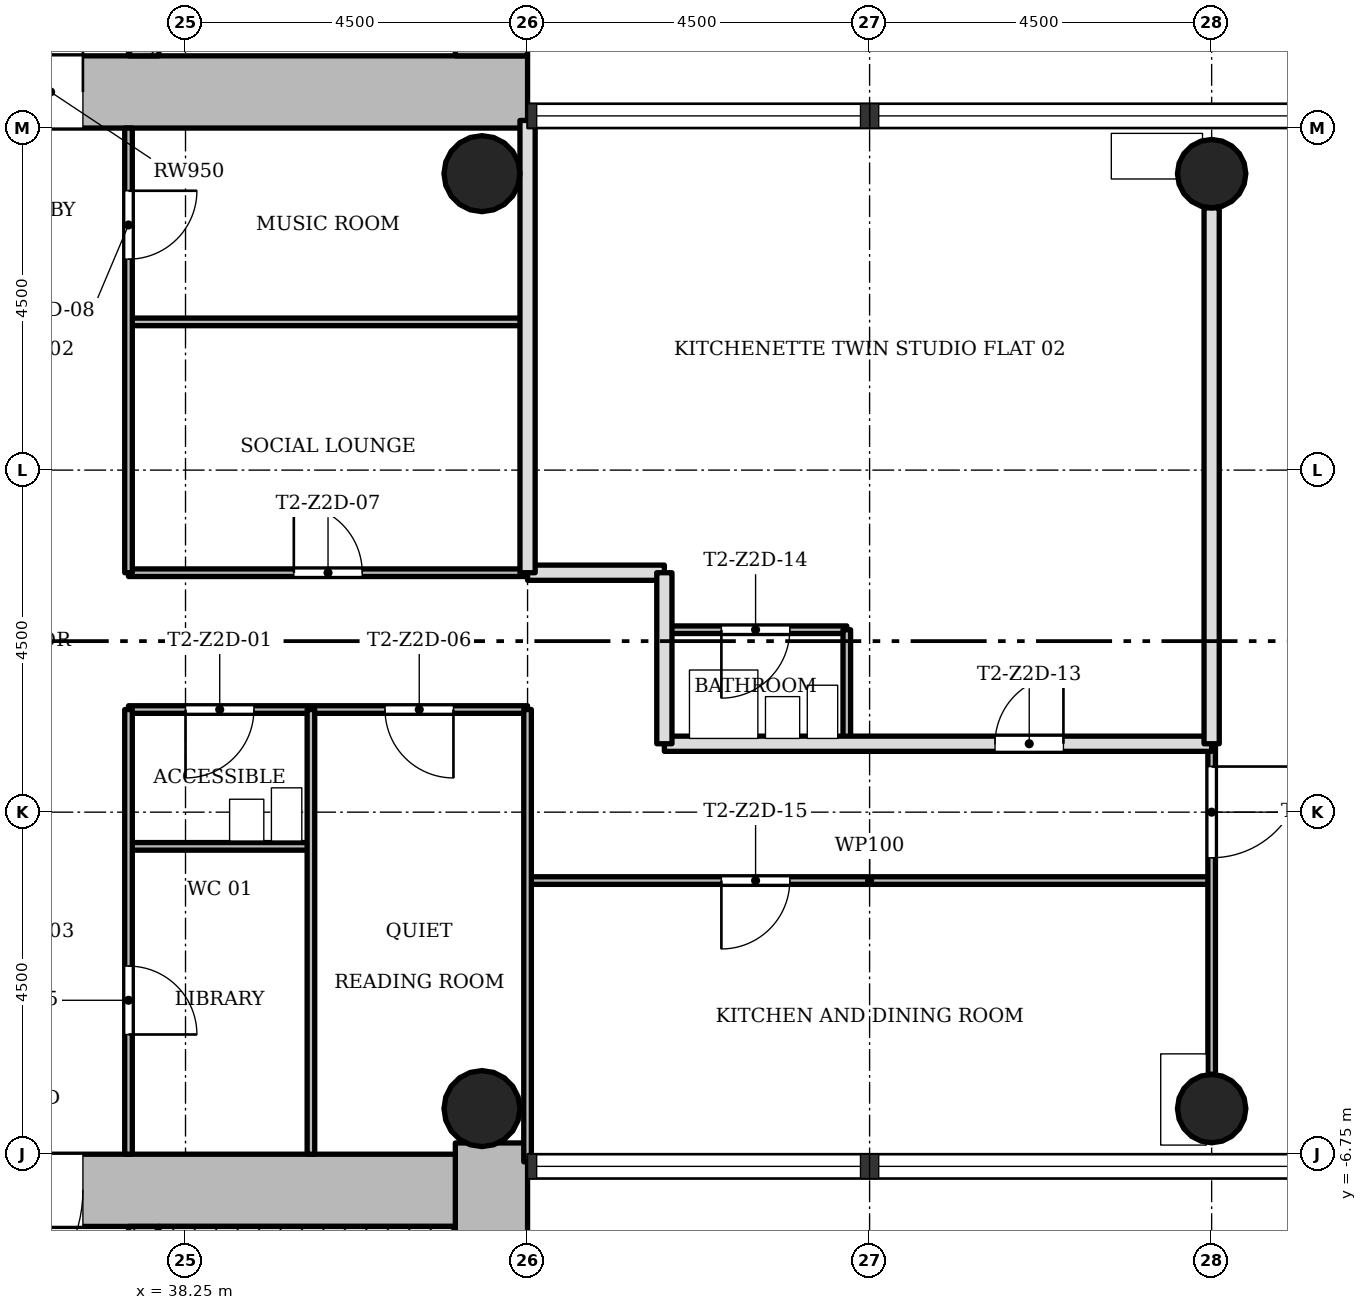
"""IFC4 building model, lengths in metres.
Left out: names, types, materials, properties, quantities, classifications, styles, units other than length and angle.
Written with IfcOpenShell. Run it as: python <this file> out.ifc"""

import sys

from ifc_helpers import new_model, si_unit, direction, frame, frame_2d, origin, origin_2d, place, context, subcontext, project, spatial, rectangle, hollow_circle, extrude, element, fill, save


model = new_model("IFC4")
c1 = context("Model", 3, precision=1e-05, world=origin(), true_north=direction((0.0, 1.0)))
c2 = subcontext(c1, "Body", "Model", "MODEL_VIEW")
j1 = project(units=[si_unit("LENGTHUNIT", "METRE"), si_unit("PLANEANGLEUNIT", "RADIAN")], contexts=[c1])
p1 = place(None, origin())
s1 = spatial("IfcSite", under=j1, at=p1, CompositionType="ELEMENT")
p2 = place(p1, origin())
s2 = spatial("IfcBuilding", under=s1, at=p2, CompositionType="ELEMENT")
p3 = place(p2, frame((0.0, 0.0, 120.8)))
s3 = spatial("IfcBuildingStorey", under=s2, at=p3, CompositionType="ELEMENT", Elevation=120.8)
p4 = place(p3, frame((30.2, 7.225, 0.0), z_axis=(0.0, 0.0, 1.0), x_axis=(1.0, 0.0, 0.0)))
e1 = element("IfcWall", 1, at=p4, inside=s3, PredefinedType="SHEAR", context=c2, shape_type="SweptSolid", body=[
    extrude(rectangle(XDim=12.55, YDim=0.95, at=frame_2d((6.275, 0.0))), origin(), (0.0, 0.0, 1.0), 3.4),
])
p5 = place(p4, frame((4.9, 0.0, 0.0)))
e2 = element("IfcOpeningElement", 2, at=p5, cuts=e1, PredefinedType="OPENING", context=c2, shape_type="SweptSolid", body=[
    extrude(rectangle(XDim=1.8, YDim=2.1, at=frame_2d((0.9, 1.05))), frame((0.0, 0.485, 0.0), z_axis=(0.0, -1.0, 0.0), x_axis=(1.0, 0.0, 0.0)), (0.0, 0.0, 1.0), 0.97),
])
p6 = place(p3, frame((42.275, 7.7, 0.0), z_axis=(0.0, 0.0, 1.0), x_axis=(0.0, 1.0, 0.0)))
e3 = element("IfcWall", 3, at=p6, inside=s3, PredefinedType="SHEAR", context=c2, shape_type="SweptSolid", body=[
    extrude(rectangle(XDim=8.05, YDim=0.95, at=frame_2d((4.025, 0.0))), origin(), (0.0, 0.0, 1.0), 3.4),
])
p7 = place(p3, frame((37.7, 7.7, 0.0), z_axis=(0.0, 0.0, 1.0), x_axis=(0.0, 1.0, 0.0)))
e4 = element("IfcWall", 4, at=p7, inside=s3, PredefinedType="SHEAR", context=c2, shape_type="SweptSolid", body=[
    extrude(rectangle(XDim=7.1, YDim=0.4, at=frame_2d((3.55, 0.0))), origin(), (0.0, 0.0, 1.0), 3.4),
])
p8 = place(p7, frame((0.8, 0.0, 0.0)))
e5 = element("IfcOpeningElement", 5, at=p8, cuts=e4, PredefinedType="OPENING", context=c2, shape_type="SweptSolid", body=[
    extrude(rectangle(XDim=1.1, YDim=2.1, at=frame_2d((0.55, 1.05))), frame((0.0, 0.21, 0.0), z_axis=(0.0, -1.0, 0.0), x_axis=(1.0, 0.0, 0.0)), (0.0, 0.0, 1.0), 0.42),
])
p9 = place(p7, frame((3.0, 0.0, 0.0)))
e6 = element("IfcOpeningElement", 6, at=p9, cuts=e4, PredefinedType="OPENING", context=c2, shape_type="SweptSolid", body=[
    extrude(rectangle(XDim=1.1, YDim=2.1, at=frame_2d((0.55, 1.05))), frame((0.0, 0.21, 0.0), z_axis=(0.0, -1.0, 0.0), x_axis=(1.0, 0.0, 0.0)), (0.0, 0.0, 1.0), 0.42),
])
p10 = place(p7, frame((5.2, 0.0, 0.0)))
e7 = element("IfcOpeningElement", 7, at=p10, cuts=e4, PredefinedType="OPENING", context=c2, shape_type="SweptSolid", body=[
    extrude(rectangle(XDim=1.1, YDim=2.1, at=frame_2d((0.55, 1.05))), frame((0.0, 0.21, 0.0), z_axis=(0.0, -1.0, 0.0), x_axis=(1.0, 0.0, 0.0)), (0.0, 0.0, 1.0), 0.42),
])
p11 = place(p3, frame((42.275, -14.8, 0.0), z_axis=(0.0, 0.0, 1.0), x_axis=(0.0, 1.0, 0.0)))
e8 = element("IfcWall", 8, at=p11, inside=s3, PredefinedType="SHEAR", context=c2, shape_type="SweptSolid", body=[
    extrude(rectangle(XDim=8.198, YDim=0.95, at=frame_2d((4.099, 0.0))), origin(), (0.0, 0.0, 1.0), 3.4),
])
p12 = place(p3, frame((41.8, -7.225, 0.0), z_axis=(0.0, 0.0, 1.0), x_axis=(-1.0, 0.0, 0.0)))
e9 = element("IfcWall", 9, at=p12, inside=s3, PredefinedType="SHEAR", context=c2, shape_type="SweptSolid", body=[
    extrude(rectangle(XDim=12.55, YDim=0.95, at=frame_2d((6.275, 0.0))), origin(), (0.0, 0.0, 1.0), 3.4),
])
p13 = place(p12, frame((4.9, 0.0, 0.0)))
e10 = element("IfcOpeningElement", 10, at=p13, cuts=e9, PredefinedType="OPENING", context=c2, shape_type="SweptSolid", body=[
    extrude(rectangle(XDim=1.8, YDim=2.1, at=frame_2d((0.9, 1.05))), frame((0.0, 0.485, 0.0), z_axis=(0.0, -1.0, 0.0), x_axis=(1.0, 0.0, 0.0)), (0.0, 0.0, 1.0), 0.97),
])
p14 = place(p3, frame((37.7, -14.8, 0.0), z_axis=(0.0, 0.0, 1.0), x_axis=(0.0, 1.0, 0.0)))
e11 = element("IfcWall", 11, at=p14, inside=s3, PredefinedType="SHEAR", context=c2, shape_type="SweptSolid", body=[
    extrude(rectangle(XDim=7.1, YDim=0.4, at=frame_2d((3.55, 0.0))), origin(), (0.0, 0.0, 1.0), 3.4),
])
p15 = place(p14, frame((5.5, 0.0, 0.0)))
e12 = element("IfcOpeningElement", 12, at=p15, cuts=e11, PredefinedType="OPENING", context=c2, shape_type="SweptSolid", body=[
    extrude(rectangle(XDim=0.9, YDim=2.1, at=frame_2d((0.45, 1.05))), frame((0.0, 0.21, 0.0), z_axis=(0.0, -1.0, 0.0), x_axis=(1.0, 0.0, 0.0)), (0.0, 0.0, 1.0), 0.42),
])
for number, where, z_axis, x_axis in (
    (13, (51.75, -6.15, 0.0), (0.0, 0.0, 1.0), (1.0, 0.0, 0.0)),
    (14, (51.75, 6.15, 0.0), (0.0, 0.0, 1.0), (1.0, 0.0, 0.0)),
):
    element("IfcColumn", number, at=place(p3, frame(where, z_axis=z_axis, x_axis=x_axis)), inside=s3, PredefinedType="COLUMN", context=c2, shape_type="SweptSolid", body=[
        extrude(hollow_circle(Radius=0.45, WallThickness=0.032, at=origin_2d()), origin(), (0.0, 0.0, 1.0), 3.4),
    ])
for number, where, z_axis, x_axis in (
    (15, (42.15, -6.15, 0.0), (0.0, 0.0, 1.0), (1.0, 0.0, 0.0)),
    (16, (42.15, 6.15, 0.0), (0.0, 0.0, 1.0), (1.0, 0.0, 0.0)),
):
    element("IfcColumn", number, at=place(p3, frame(where, z_axis=z_axis, x_axis=x_axis)), inside=s3, PredefinedType="COLUMN", context=c2, shape_type="SweptSolid", body=[
        extrude(hollow_circle(Radius=0.5, WallThickness=0.036, at=origin_2d()), origin(), (0.0, 0.0, 1.0), 3.4),
    ])
p16 = place(p3, frame((51.75, -3.15, 0.0), z_axis=(0.0, 0.0, 1.0), x_axis=(-1.0, 0.0, 0.0)))
e17 = element("IfcWall", 17, at=p16, inside=s3, PredefinedType="PARTITIONING", context=c2, shape_type="SweptSolid", body=[
    extrude(rectangle(XDim=9.0, YDim=0.1, at=frame_2d((4.5, 0.0))), origin(), (0.0, 0.0, 1.0), 3.0),
])
p17 = place(p16, frame((5.55, 0.0, 0.0)))
e18 = element("IfcOpeningElement", 18, at=p17, cuts=e17, PredefinedType="OPENING", context=c2, shape_type="SweptSolid", body=[
    extrude(rectangle(XDim=0.9, YDim=2.1, at=frame_2d((0.45, 1.05))), frame((0.0, 0.06, 0.0), z_axis=(0.0, -1.0, 0.0), x_axis=(1.0, 0.0, 0.0)), (0.0, 0.0, 1.0), 0.12),
])
p18 = place(p3, frame((39.9, -2.7, 0.0), z_axis=(0.0, 0.0, 1.0), x_axis=(-1.0, 0.0, 0.0)))
e19 = element("IfcWall", 19, at=p18, inside=s3, PredefinedType="PARTITIONING", context=c2, shape_type="SweptSolid", body=[
    extrude(rectangle(XDim=2.4, YDim=0.1, at=frame_2d((1.2, 0.0))), origin(), (0.0, 0.0, 1.0), 3.0),
])
p19 = place(p3, frame((51.75, -1.35, 0.0), z_axis=(0.0, 0.0, 1.0), x_axis=(-1.0, 0.0, 0.0)))
e20 = element("IfcWall", 20, at=p19, inside=s3, PredefinedType="SOLIDWALL", context=c2, shape_type="SweptSolid", body=[
    extrude(rectangle(XDim=7.2, YDim=0.2, at=frame_2d((3.6, 0.0))), origin(), (0.0, 0.0, 1.0), 3.0),
])
p20 = place(p19, frame((1.95, 0.0, 0.0)))
e21 = element("IfcOpeningElement", 21, at=p20, cuts=e20, PredefinedType="OPENING", context=c2, shape_type="SweptSolid", body=[
    extrude(rectangle(XDim=0.9, YDim=2.1, at=frame_2d((0.45, 1.05))), frame((0.0, 0.11, 0.0), z_axis=(0.0, -1.0, 0.0), x_axis=(1.0, 0.0, 0.0)), (0.0, 0.0, 1.0), 0.22),
])
p21 = place(p3, frame((42.75, -0.9, 0.0), z_axis=(0.0, 0.0, 1.0), x_axis=(-1.0, 0.0, 0.0)))
e22 = element("IfcWall", 22, at=p21, inside=s3, PredefinedType="PARTITIONING", context=c2, shape_type="SweptSolid", body=[
    extrude(rectangle(XDim=5.25, YDim=0.1, at=frame_2d((2.625, 0.0))), origin(), (0.0, 0.0, 1.0), 3.0),
])
p22 = place(p21, frame((3.6, 0.0, 0.0)))
e23 = element("IfcOpeningElement", 23, at=p22, cuts=e22, PredefinedType="OPENING", context=c2, shape_type="SweptSolid", body=[
    extrude(rectangle(XDim=0.9, YDim=2.1, at=frame_2d((0.45, 1.05))), frame((0.0, 0.06, 0.0), z_axis=(0.0, -1.0, 0.0), x_axis=(1.0, 0.0, 0.0)), (0.0, 0.0, 1.0), 0.12),
])
p23 = place(p21, frame((0.975, 0.0, 0.0)))
e24 = element("IfcOpeningElement", 24, at=p23, cuts=e22, PredefinedType="OPENING", context=c2, shape_type="SweptSolid", body=[
    extrude(rectangle(XDim=0.9, YDim=2.1, at=frame_2d((0.45, 1.05))), frame((0.0, 0.06, 0.0), z_axis=(0.0, -1.0, 0.0), x_axis=(1.0, 0.0, 0.0)), (0.0, 0.0, 1.0), 0.12),
])
p24 = place(p3, frame((46.95, 0.15, 0.0), z_axis=(0.0, 0.0, 1.0), x_axis=(-1.0, 0.0, 0.0)))
e25 = element("IfcWall", 25, at=p24, inside=s3, PredefinedType="PARTITIONING", context=c2, shape_type="SweptSolid", body=[
    extrude(rectangle(XDim=2.4, YDim=0.1, at=frame_2d((1.2, 0.0))), origin(), (0.0, 0.0, 1.0), 3.0),
])
p25 = place(p24, frame((0.75, 0.0, 0.0)))
e26 = element("IfcOpeningElement", 26, at=p25, cuts=e25, PredefinedType="OPENING", context=c2, shape_type="SweptSolid", body=[
    extrude(rectangle(XDim=0.9, YDim=2.1, at=frame_2d((0.45, 1.05))), frame((0.0, 0.06, 0.0), z_axis=(0.0, -1.0, 0.0), x_axis=(1.0, 0.0, 0.0)), (0.0, 0.0, 1.0), 0.12),
])
p26 = place(p3, frame((42.75, 0.9, 0.0), z_axis=(0.0, 0.0, 1.0), x_axis=(-1.0, 0.0, 0.0)))
e27 = element("IfcWall", 27, at=p26, inside=s3, PredefinedType="PARTITIONING", context=c2, shape_type="SweptSolid", body=[
    extrude(rectangle(XDim=5.25, YDim=0.1, at=frame_2d((2.625, 0.0))), origin(), (0.0, 0.0, 1.0), 3.0),
])
p27 = place(p26, frame((2.175, 0.0, 0.0)))
e28 = element("IfcOpeningElement", 28, at=p27, cuts=e27, PredefinedType="OPENING", context=c2, shape_type="SweptSolid", body=[
    extrude(rectangle(XDim=0.9, YDim=2.1, at=frame_2d((0.45, 1.05))), frame((0.0, 0.06, 0.0), z_axis=(0.0, -1.0, 0.0), x_axis=(1.0, 0.0, 0.0)), (0.0, 0.0, 1.0), 0.12),
])
p28 = place(p3, frame((44.55, 0.9, 0.0), z_axis=(0.0, 0.0, 1.0), x_axis=(-1.0, 0.0, 0.0)))
e29 = element("IfcWall", 29, at=p28, inside=s3, PredefinedType="SOLIDWALL", context=c2, shape_type="SweptSolid", body=[
    extrude(rectangle(XDim=1.8, YDim=0.2, at=frame_2d((0.9, 0.0))), origin(), (0.0, 0.0, 1.0), 3.0),
])
p29 = place(p3, frame((42.75, 4.2, 0.0), z_axis=(0.0, 0.0, 1.0), x_axis=(-1.0, 0.0, 0.0)))
e30 = element("IfcWall", 30, at=p29, inside=s3, PredefinedType="PARTITIONING", context=c2, shape_type="SweptSolid", body=[
    extrude(rectangle(XDim=5.25, YDim=0.1, at=frame_2d((2.625, 0.0))), origin(), (0.0, 0.0, 1.0), 3.0),
])
p30 = place(p3, frame((51.75, -5.7, 0.0), z_axis=(0.0, 0.0, 1.0), x_axis=(0.0, 1.0, 0.0)))
e31 = element("IfcWall", 31, at=p30, inside=s3, PredefinedType="PARTITIONING", context=c2, shape_type="SweptSolid", body=[
    extrude(rectangle(XDim=4.35, YDim=0.1, at=frame_2d((2.175, 0.0))), origin(), (0.0, 0.0, 1.0), 3.0),
])
p31 = place(p30, frame((2.85, 0.0, 0.0)))
e32 = element("IfcOpeningElement", 32, at=p31, cuts=e31, PredefinedType="OPENING", context=c2, shape_type="SweptSolid", body=[
    extrude(rectangle(XDim=1.2, YDim=2.1, at=frame_2d((0.6, 1.05))), frame((0.0, 0.06, 0.0), z_axis=(0.0, -1.0, 0.0), x_axis=(1.0, 0.0, 0.0)), (0.0, 0.0, 1.0), 0.12),
])
p32 = place(p3, frame((51.75, -1.35, 0.0), z_axis=(0.0, 0.0, 1.0), x_axis=(0.0, 1.0, 0.0)))
e33 = element("IfcWall", 33, at=p32, inside=s3, PredefinedType="SOLIDWALL", context=c2, shape_type="SweptSolid", body=[
    extrude(rectangle(XDim=7.05, YDim=0.2, at=frame_2d((3.525, 0.0))), origin(), (0.0, 0.0, 1.0), 3.0),
])
p33 = place(p3, frame((46.95, -1.35, 0.0), z_axis=(0.0, 0.0, 1.0), x_axis=(0.0, 1.0, 0.0)))
e34 = element("IfcWall", 34, at=p33, inside=s3, PredefinedType="PARTITIONING", context=c2, shape_type="SweptSolid", body=[
    extrude(rectangle(XDim=1.5, YDim=0.1, at=frame_2d((0.75, 0.0))), origin(), (0.0, 0.0, 1.0), 3.0),
])
p34 = place(p3, frame((44.55, -1.35, 0.0), z_axis=(0.0, 0.0, 1.0), x_axis=(0.0, 1.0, 0.0)))
e35 = element("IfcWall", 35, at=p34, inside=s3, PredefinedType="SOLIDWALL", context=c2, shape_type="SweptSolid", body=[
    extrude(rectangle(XDim=2.25, YDim=0.2, at=frame_2d((1.125, 0.0))), origin(), (0.0, 0.0, 1.0), 3.0),
])
p35 = place(p3, frame((42.75, -6.85, 0.0), z_axis=(0.0, 0.0, 1.0), x_axis=(0.0, 1.0, 0.0)))
e36 = element("IfcWall", 36, at=p35, inside=s3, PredefinedType="PARTITIONING", context=c2, shape_type="SweptSolid", body=[
    extrude(rectangle(XDim=5.95, YDim=0.1, at=frame_2d((2.975, 0.0))), origin(), (0.0, 0.0, 1.0), 3.0),
])
p36 = place(p3, frame((42.75, 0.9, 0.0), z_axis=(0.0, 0.0, 1.0), x_axis=(0.0, 1.0, 0.0)))
e37 = element("IfcWall", 37, at=p36, inside=s3, PredefinedType="SOLIDWALL", context=c2, shape_type="SweptSolid", body=[
    extrude(rectangle(XDim=5.95, YDim=0.2, at=frame_2d((2.975, 0.0))), origin(), (0.0, 0.0, 1.0), 3.0),
])
p37 = place(p3, frame((39.9, -6.75, 0.0), z_axis=(0.0, 0.0, 1.0), x_axis=(0.0, 1.0, 0.0)))
e38 = element("IfcWall", 38, at=p37, inside=s3, PredefinedType="PARTITIONING", context=c2, shape_type="SweptSolid", body=[
    extrude(rectangle(XDim=5.85, YDim=0.1, at=frame_2d((2.925, 0.0))), origin(), (0.0, 0.0, 1.0), 3.0),
])
p38 = place(p3, frame((37.5, -6.75, 0.0), z_axis=(0.0, 0.0, 1.0), x_axis=(0.0, 1.0, 0.0)))
e39 = element("IfcWall", 39, at=p38, inside=s3, PredefinedType="PARTITIONING", context=c2, shape_type="SweptSolid", body=[
    extrude(rectangle(XDim=5.85, YDim=0.1, at=frame_2d((2.925, 0.0))), origin(), (0.0, 0.0, 1.0), 3.0),
])
p39 = place(p38, frame((1.575, 0.0, 0.0)))
e40 = element("IfcOpeningElement", 40, at=p39, cuts=e39, PredefinedType="OPENING", context=c2, shape_type="SweptSolid", body=[
    extrude(rectangle(XDim=0.9, YDim=2.1, at=frame_2d((0.45, 1.05))), frame((0.0, 0.06, 0.0), z_axis=(0.0, -1.0, 0.0), x_axis=(1.0, 0.0, 0.0)), (0.0, 0.0, 1.0), 0.12),
])
p40 = place(p3, frame((37.5, 0.9, 0.0), z_axis=(0.0, 0.0, 1.0), x_axis=(0.0, 1.0, 0.0)))
e41 = element("IfcWall", 41, at=p40, inside=s3, PredefinedType="PARTITIONING", context=c2, shape_type="SweptSolid", body=[
    extrude(rectangle(XDim=5.85, YDim=0.1, at=frame_2d((2.925, 0.0))), origin(), (0.0, 0.0, 1.0), 3.0),
])
p41 = place(p40, frame((4.125, 0.0, 0.0)))
e42 = element("IfcOpeningElement", 42, at=p41, cuts=e41, PredefinedType="OPENING", context=c2, shape_type="SweptSolid", body=[
    extrude(rectangle(XDim=0.9, YDim=2.1, at=frame_2d((0.45, 1.05))), frame((0.0, 0.06, 0.0), z_axis=(0.0, -1.0, 0.0), x_axis=(1.0, 0.0, 0.0)), (0.0, 0.0, 1.0), 0.12),
])
p42 = place(p3, frame((37.9, -7.825, 0.0), z_axis=(0.0, 0.0, 1.0), x_axis=(1.0, 0.0, 0.0)))
e43 = element("IfcWall", 43, at=p42, inside=s3, PredefinedType="SHEAR", context=c2, shape_type="SweptSolid", body=[
    extrude(rectangle(XDim=3.9, YDim=0.25, at=frame_2d((1.95, 0.0))), origin(), (0.0, 0.0, 1.0), 3.4),
])
p43 = place(p22, origin())
e44 = element("IfcDoor", 44, at=p43, inside=s3, OperationType="SINGLE_SWING_LEFT", PredefinedType="DOOR", context=c2, shape_type="SweptSolid", body=[
    extrude(rectangle(XDim=0.9, YDim=2.1, at=frame_2d((0.45, 1.05))), frame((0.0, 0.025, 0.0), z_axis=(0.0, -1.0, 0.0), x_axis=(1.0, 0.0, 0.0)), (0.0, 0.0, 1.0), 0.05),
])
fill(e23, e44)
p44 = place(p39, origin())
e45 = element("IfcDoor", 45, at=p44, inside=s3, OperationType="SINGLE_SWING_LEFT", PredefinedType="DOOR", context=c2, shape_type="SweptSolid", body=[
    extrude(rectangle(XDim=0.9, YDim=2.1, at=frame_2d((0.45, 1.05))), frame((0.0, 0.025, 0.0), z_axis=(0.0, -1.0, 0.0), x_axis=(1.0, 0.0, 0.0)), (0.0, 0.0, 1.0), 0.05),
])
fill(e40, e45)
p45 = place(p23, origin())
e46 = element("IfcDoor", 46, at=p45, inside=s3, OperationType="SINGLE_SWING_RIGHT", PredefinedType="DOOR", context=c2, shape_type="SweptSolid", body=[
    extrude(rectangle(XDim=0.9, YDim=2.1, at=frame_2d((0.45, 1.05))), frame((0.0, 0.025, 0.0), z_axis=(0.0, -1.0, 0.0), x_axis=(1.0, 0.0, 0.0)), (0.0, 0.0, 1.0), 0.05),
])
fill(e24, e46)
p46 = place(p27, origin())
e47 = element("IfcDoor", 47, at=p46, inside=s3, OperationType="SINGLE_SWING_RIGHT", PredefinedType="DOOR", context=c2, shape_type="SweptSolid", body=[
    extrude(rectangle(XDim=0.9, YDim=2.1, at=frame_2d((0.45, 1.05))), frame((0.0, 0.025, 0.0), z_axis=(0.0, -1.0, 0.0), x_axis=(1.0, 0.0, 0.0)), (0.0, 0.0, 1.0), 0.05),
])
fill(e28, e47)
p47 = place(p41, origin())
e48 = element("IfcDoor", 48, at=p47, inside=s3, OperationType="SINGLE_SWING_RIGHT", PredefinedType="DOOR", context=c2, shape_type="SweptSolid", body=[
    extrude(rectangle(XDim=0.9, YDim=2.1, at=frame_2d((0.45, 1.05))), frame((0.0, 0.025, 0.0), z_axis=(0.0, -1.0, 0.0), x_axis=(1.0, 0.0, 0.0)), (0.0, 0.0, 1.0), 0.05),
])
fill(e42, e48)
p48 = place(p20, origin())
e49 = element("IfcDoor", 49, at=p48, inside=s3, OperationType="SINGLE_SWING_LEFT", PredefinedType="DOOR", context=c2, shape_type="SweptSolid", body=[
    extrude(rectangle(XDim=0.9, YDim=2.1, at=frame_2d((0.45, 1.05))), frame((0.0, 0.025, 0.0), z_axis=(0.0, -1.0, 0.0), x_axis=(1.0, 0.0, 0.0)), (0.0, 0.0, 1.0), 0.05),
])
fill(e21, e49)
p49 = place(p25, origin())
e50 = element("IfcDoor", 50, at=p49, inside=s3, OperationType="SINGLE_SWING_LEFT", PredefinedType="DOOR", context=c2, shape_type="SweptSolid", body=[
    extrude(rectangle(XDim=0.9, YDim=2.1, at=frame_2d((0.45, 1.05))), frame((0.0, 0.025, 0.0), z_axis=(0.0, -1.0, 0.0), x_axis=(1.0, 0.0, 0.0)), (0.0, 0.0, 1.0), 0.05),
])
fill(e26, e50)
p50 = place(p17, origin())
e51 = element("IfcDoor", 51, at=p50, inside=s3, OperationType="SINGLE_SWING_LEFT", PredefinedType="DOOR", context=c2, shape_type="SweptSolid", body=[
    extrude(rectangle(XDim=0.9, YDim=2.1, at=frame_2d((0.45, 1.05))), frame((0.0, 0.025, 0.0), z_axis=(0.0, -1.0, 0.0), x_axis=(1.0, 0.0, 0.0)), (0.0, 0.0, 1.0), 0.05),
])
fill(e18, e51)
p51 = place(p31, origin())
e52 = element("IfcDoor", 52, at=p51, inside=s3, OperationType="SINGLE_SWING_RIGHT", PredefinedType="DOOR", context=c2, shape_type="SweptSolid", body=[
    extrude(rectangle(XDim=1.2, YDim=2.1, at=frame_2d((0.6, 1.05))), frame((0.0, 0.025, 0.0), z_axis=(0.0, -1.0, 0.0), x_axis=(1.0, 0.0, 0.0)), (0.0, 0.0, 1.0), 0.05),
])
fill(e32, e52)
p52 = place(p5, origin())
e53 = element("IfcDoor", 53, at=p52, inside=s3, OperationType="SINGLE_SWING_LEFT", PredefinedType="DOOR", context=c2, shape_type="SweptSolid", body=[
    extrude(rectangle(XDim=1.8, YDim=2.1, at=frame_2d((0.9, 1.05))), frame((0.0, 0.025, 0.0), z_axis=(0.0, -1.0, 0.0), x_axis=(1.0, 0.0, 0.0)), (0.0, 0.0, 1.0), 0.05),
])
fill(e2, e53)
p53 = place(p13, origin())
e54 = element("IfcDoor", 54, at=p53, inside=s3, OperationType="SINGLE_SWING_LEFT", PredefinedType="DOOR", context=c2, shape_type="SweptSolid", body=[
    extrude(rectangle(XDim=1.8, YDim=2.1, at=frame_2d((0.9, 1.05))), frame((0.0, 0.025, 0.0), z_axis=(0.0, -1.0, 0.0), x_axis=(1.0, 0.0, 0.0)), (0.0, 0.0, 1.0), 0.05),
])
fill(e10, e54)
save(model, sys.argv[1])
